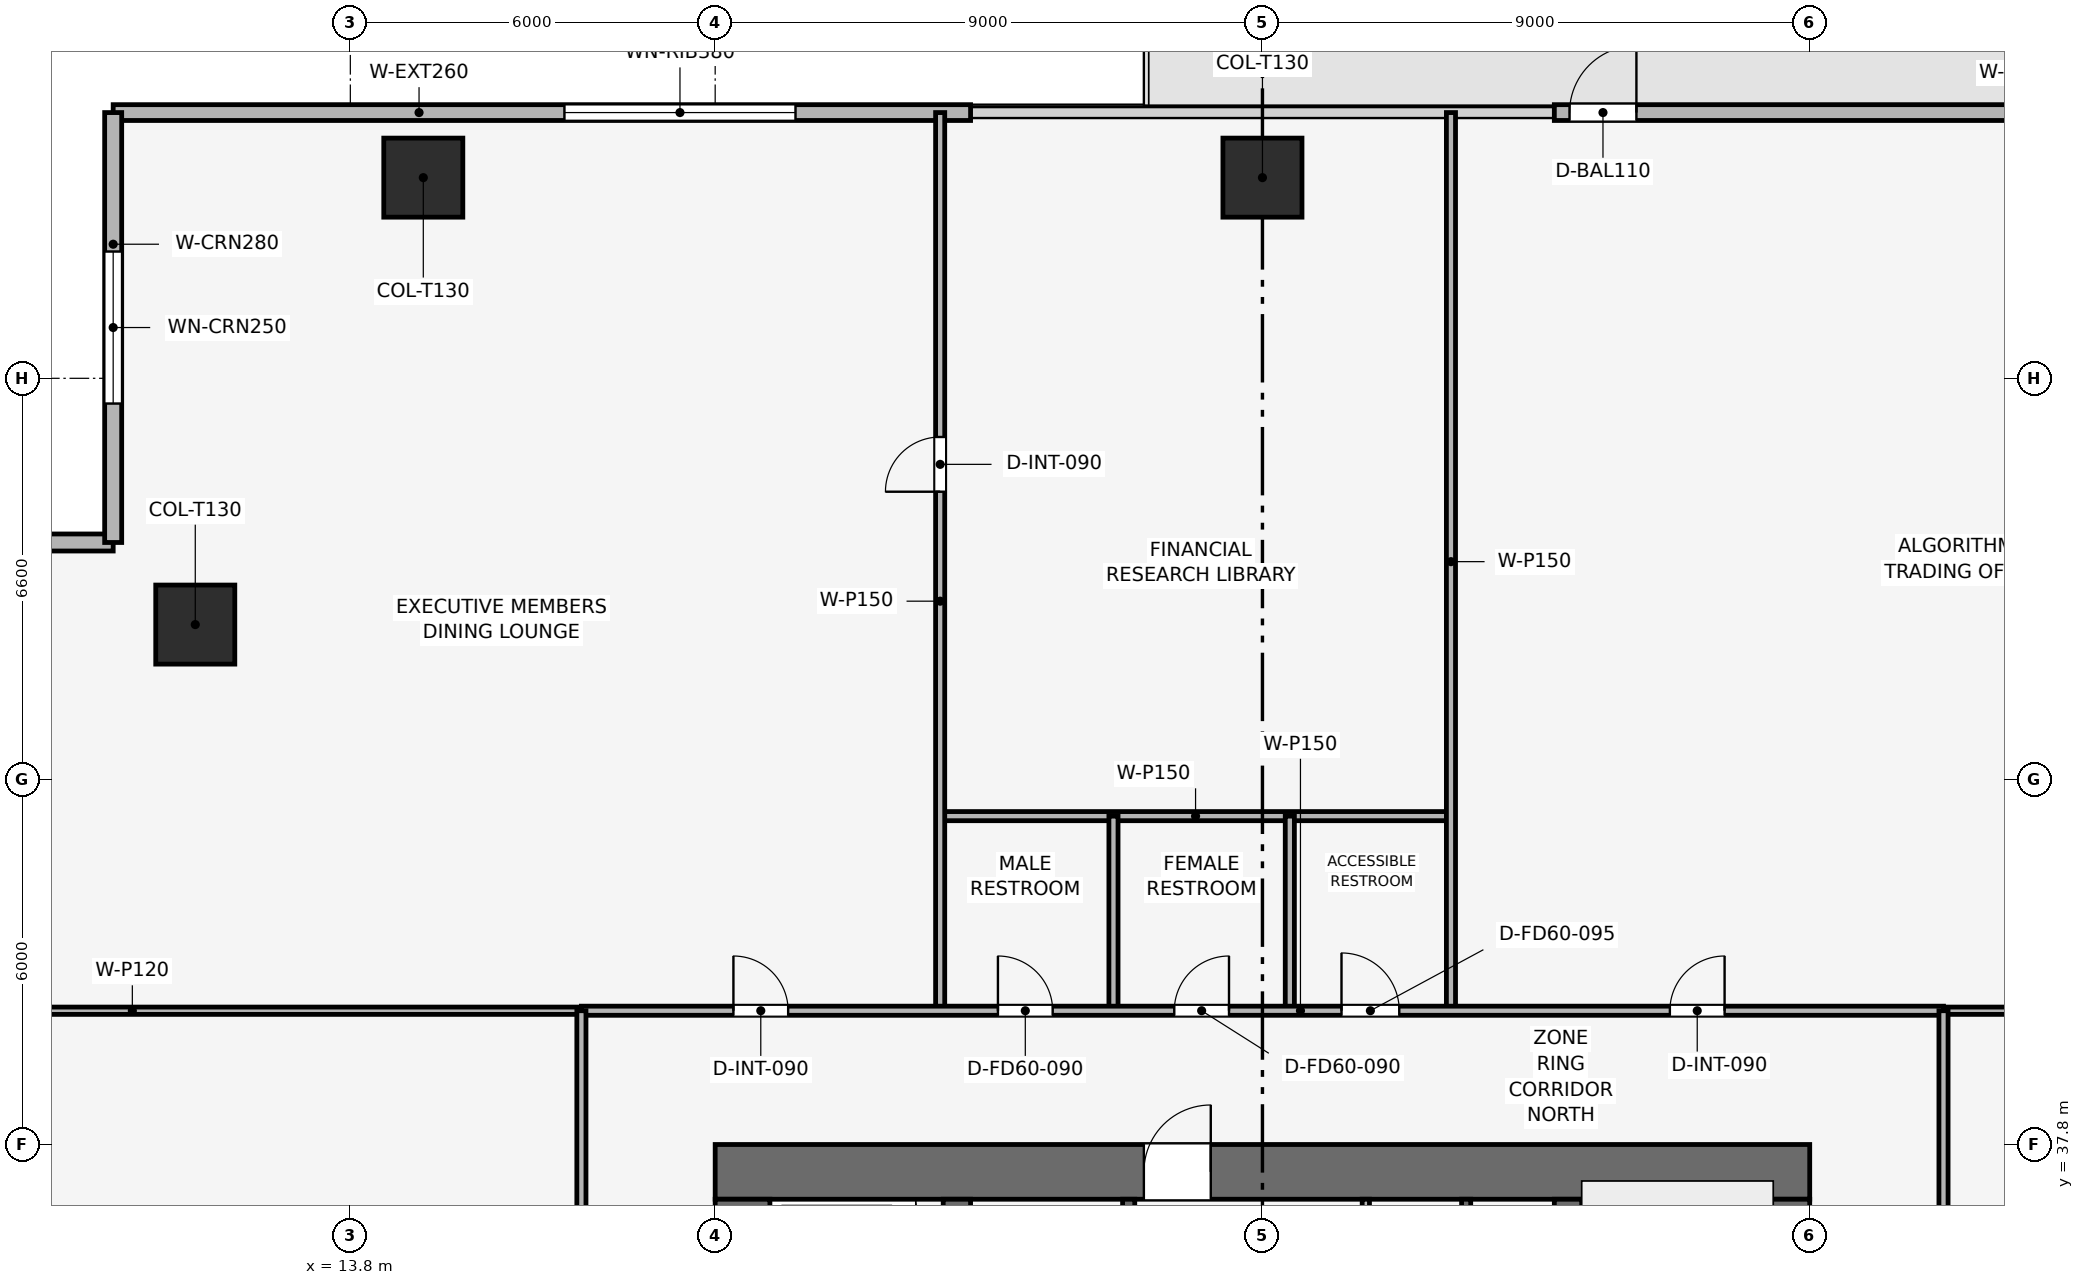
"""IFC4 building model, lengths in metres.
Left out: names, types, materials, properties, quantities, classifications, styles, units other than length and angle.
Written with IfcOpenShell. Run it as: python <this file> out.ifc"""

import sys

from ifc_helpers import new_model, si_unit, direction, frame, frame_2d, origin, origin_2d, place, context, subcontext, project, spatial, rectangle, extrude, element, fill, save


model = new_model("IFC4")
c1 = context("Model", 3, precision=1e-05, world=origin(), true_north=direction((0.0, 1.0)))
c2 = subcontext(c1, "Body", "Model", "MODEL_VIEW")
j1 = project(units=[si_unit("LENGTHUNIT", "METRE"), si_unit("PLANEANGLEUNIT", "RADIAN")], contexts=[c1])
p1 = place(None, origin())
s1 = spatial("IfcSite", under=j1, at=p1, CompositionType="ELEMENT")
p2 = place(p1, origin())
s2 = spatial("IfcBuilding", under=s1, at=p2, CompositionType="ELEMENT")
p3 = place(p2, frame((0.0, 0.0, 125.1)))
s3 = spatial("IfcBuildingStorey", under=s2, at=p3, CompositionType="ELEMENT", Elevation=125.1)
p4 = place(p3, frame((19.8, 37.35, 0.0), z_axis=(0.0, 0.0, 1.0), x_axis=(1.0, 0.0, 0.0)))
e1 = element("IfcWall", 1, at=p4, inside=s3, PredefinedType="SHEAR", context=c2, shape_type="SweptSolid", body=[
    extrude(rectangle(XDim=18.0, YDim=0.9, at=frame_2d((9.0, 0.0))), origin(), (0.0, 0.0, 1.0), 3.9),
])
p5 = place(p4, frame((7.05, 0.0, 0.0)))
e2 = element("IfcOpeningElement", 2, at=p5, cuts=e1, PredefinedType="OPENING", context=c2, shape_type="SweptSolid", body=[
    extrude(rectangle(XDim=1.1, YDim=2.15, at=frame_2d((0.55, 1.075))), frame((0.0, 0.46, 0.0), z_axis=(0.0, -1.0, 0.0), x_axis=(1.0, 0.0, 0.0)), (0.0, 0.0, 1.0), 0.92),
])
p6 = place(p3, frame((20.25, 20.7, 0.0), z_axis=(0.0, 0.0, 1.0), x_axis=(0.0, 1.0, 0.0)))
e3 = element("IfcWall", 3, at=p6, inside=s3, PredefinedType="SHEAR", context=c2, shape_type="SweptSolid", body=[
    extrude(rectangle(XDim=16.2, YDim=0.9, at=frame_2d((8.1, 0.0))), origin(), (0.0, 0.0, 1.0), 3.9),
])
p7 = place(p6, frame((10.1, 0.0, 0.0)))
e4 = element("IfcOpeningElement", 4, at=p7, cuts=e3, PredefinedType="OPENING", context=c2, shape_type="SweptSolid", body=[
    extrude(rectangle(XDim=1.1, YDim=2.15, at=frame_2d((0.55, 1.075))), frame((0.0, 0.46, 0.0), z_axis=(0.0, -1.0, 0.0), x_axis=(1.0, 0.0, 0.0)), (0.0, 0.0, 1.0), 0.92),
])
p8 = place(p3, frame((37.35, 20.7, 0.0), z_axis=(0.0, 0.0, 1.0), x_axis=(0.0, 1.0, 0.0)))
e5 = element("IfcWall", 5, at=p8, inside=s3, PredefinedType="SHEAR", context=c2, shape_type="SweptSolid", body=[
    extrude(rectangle(XDim=16.2, YDim=0.9, at=frame_2d((8.1, 0.0))), origin(), (0.0, 0.0, 1.0), 3.9),
])
p9 = place(p8, frame((4.6, 0.0, 0.0)))
e6 = element("IfcOpeningElement", 6, at=p9, cuts=e5, PredefinedType="OPENING", context=c2, shape_type="SweptSolid", body=[
    extrude(rectangle(XDim=1.1, YDim=2.15, at=frame_2d((0.55, 1.075))), frame((0.0, 0.46, 0.0), z_axis=(0.0, -1.0, 0.0), x_axis=(1.0, 0.0, 0.0)), (0.0, 0.0, 1.0), 0.92),
])
for number, where, z_axis, x_axis in (
    (7, (23.775, 20.7, 0.0), (0.0, 0.0, 1.0), (0.0, 1.0, 0.0)),
    (8, (33.825, 20.7, 0.0), (0.0, 0.0, 1.0), (0.0, 1.0, 0.0)),
):
    element("IfcWall", number, at=place(p3, frame(where, z_axis=z_axis, x_axis=x_axis)), inside=s3, PredefinedType="SHEAR", context=c2, shape_type="SweptSolid", body=[
        extrude(rectangle(XDim=16.2, YDim=0.45, at=frame_2d((8.1, 0.0))), origin(), (0.0, 0.0, 1.0), 3.9),
    ])
for number, where, z_axis, x_axis in (
    (9, (28.8, 53.7, 0.003), (0.0, 0.0, 1.0), (1.0, 0.0, 0.0)),
    (10, (15.0, 53.7, 0.003), (0.0, 0.0, 1.0), (1.0, 0.0, 0.0)),
    (11, (11.25, 46.35, 0.003), (0.0, 0.0, 1.0), (1.0, 0.0, 0.0)),
):
    element("IfcColumn", number, at=place(p3, frame(where, z_axis=z_axis, x_axis=x_axis)), inside=s3, PredefinedType="COLUMN", context=c2, shape_type="SweptSolid", body=[
        extrude(rectangle(XDim=1.3, YDim=1.3, at=origin_2d()), origin(), (0.0, 0.0, 1.0), 3.644),
    ])
p10 = place(p3, frame((9.9, 54.77, 0.0), z_axis=(0.0, 0.0, 1.0), x_axis=(1.0, 0.0, 0.0)))
e12 = element("IfcWall", 12, at=p10, inside=s3, PredefinedType="SOLIDWALL", context=c2, shape_type="SweptSolid", body=[
    extrude(rectangle(XDim=14.1, YDim=0.26, at=frame_2d((7.05, 0.0))), origin(), (0.0, 0.0, 1.0), 3.65),
])
p11 = place(p10, frame((7.421, 0.0, 0.9)))
e13 = element("IfcOpeningElement", 13, at=p11, cuts=e12, PredefinedType="OPENING", context=c2, shape_type="SweptSolid", body=[
    extrude(rectangle(XDim=3.8, YDim=1.9, at=frame_2d((1.9, 0.95))), frame((0.0, 0.14, 0.0), z_axis=(0.0, -1.0, 0.0), x_axis=(1.0, 0.0, 0.0)), (0.0, 0.0, 1.0), 0.28),
])
p12 = place(p3, frame((33.6, 54.77, 0.0), z_axis=(0.0, 0.0, 1.0), x_axis=(1.0, 0.0, 0.0)))
e14 = element("IfcWall", 14, at=p12, inside=s3, PredefinedType="SOLIDWALL", context=c2, shape_type="SweptSolid", body=[
    extrude(rectangle(XDim=14.1, YDim=0.26, at=frame_2d((7.05, 0.0))), origin(), (0.0, 0.0, 1.0), 3.65),
])
p13 = place(p12, frame((0.25, 0.0, 0.0)))
e15 = element("IfcOpeningElement", 15, at=p13, cuts=e14, PredefinedType="OPENING", context=c2, shape_type="SweptSolid", body=[
    extrude(rectangle(XDim=1.1, YDim=2.2, at=frame_2d((0.55, 1.1))), frame((0.0, 0.14, 0.0), z_axis=(0.0, -1.0, 0.0), x_axis=(1.0, 0.0, 0.0)), (0.0, 0.0, 1.0), 0.28),
])
p14 = place(p3, frame((2.83, 47.7, 0.0), z_axis=(0.0, 0.0, 1.0), x_axis=(1.0, 0.0, 0.0)))
e16 = element("IfcWall", 16, at=p14, inside=s3, PredefinedType="SOLIDWALL", context=c2, shape_type="SweptSolid", body=[
    extrude(rectangle(XDim=7.07, YDim=0.28, at=frame_2d((3.535, 0.0))), origin(), (0.0, 0.0, 1.0), 3.65),
])
p15 = place(p14, frame((2.285, 0.0, 0.9)))
e17 = element("IfcOpeningElement", 17, at=p15, cuts=e16, PredefinedType="OPENING", context=c2, shape_type="SweptSolid", body=[
    extrude(rectangle(XDim=2.5, YDim=1.9, at=frame_2d((1.25, 0.95))), frame((0.0, 0.15, 0.0), z_axis=(0.0, -1.0, 0.0), x_axis=(1.0, 0.0, 0.0)), (0.0, 0.0, 1.0), 0.3),
])
p16 = place(p3, frame((9.9, 47.7, 0.0), z_axis=(0.0, 0.0, 1.0), x_axis=(0.0, 1.0, 0.0)))
e18 = element("IfcWall", 18, at=p16, inside=s3, PredefinedType="SOLIDWALL", context=c2, shape_type="SweptSolid", body=[
    extrude(rectangle(XDim=7.07, YDim=0.28, at=frame_2d((3.535, 0.0))), origin(), (0.0, 0.0, 1.0), 3.65),
])
p17 = place(p16, frame((2.285, 0.0, 0.9)))
e19 = element("IfcOpeningElement", 19, at=p17, cuts=e18, PredefinedType="OPENING", context=c2, shape_type="SweptSolid", body=[
    extrude(rectangle(XDim=2.5, YDim=1.9, at=frame_2d((1.25, 0.95))), frame((0.0, 0.15, 0.0), z_axis=(0.0, -1.0, 0.0), x_axis=(1.0, 0.0, 0.0)), (0.0, 0.0, 1.0), 0.3),
])
p18 = place(p3, frame((32.15, 34.0, 0.0), z_axis=(0.0, 0.0, 1.0), x_axis=(0.0, 1.0, 0.0)))
e20 = element("IfcWall", 20, at=p18, inside=s3, PredefinedType="SHEAR", context=c2, shape_type="SweptSolid", body=[
    extrude(rectangle(XDim=2.9, YDim=0.15, at=frame_2d((1.45, 0.0))), origin(), (0.0, 0.0, 1.0), 3.65),
])
p19 = place(p3, frame((26.6, 34.0, 0.0), z_axis=(0.0, 0.0, 1.0), x_axis=(0.0, 1.0, 0.0)))
e21 = element("IfcWall", 21, at=p19, inside=s3, PredefinedType="SHEAR", context=c2, shape_type="SweptSolid", body=[
    extrude(rectangle(XDim=2.9, YDim=0.2, at=frame_2d((1.45, 0.0))), origin(), (0.0, 0.0, 1.0), 3.65),
])
p20 = place(p19, frame((0.75, 0.0, 0.0)))
e22 = element("IfcOpeningElement", 22, at=p20, cuts=e21, PredefinedType="OPENING", context=c2, shape_type="SweptSolid", body=[
    extrude(rectangle(XDim=1.1, YDim=2.15, at=frame_2d((0.55, 1.075))), frame((0.0, 0.11, 0.0), z_axis=(0.0, -1.0, 0.0), x_axis=(1.0, 0.0, 0.0)), (0.0, 0.0, 1.0), 0.22),
])
p21 = place(p3, frame((30.5, 33.925, 0.0), z_axis=(0.0, 0.0, 1.0), x_axis=(0.0, 1.0, 0.0)))
e23 = element("IfcWall", 23, at=p21, inside=s3, PredefinedType="PARTITIONING", context=c2, shape_type="SweptSolid", body=[
    extrude(rectangle(XDim=2.975, YDim=0.12, at=frame_2d((1.487, 0.0))), origin(), (0.0, 0.0, 1.0), 3.65),
])
p22 = place(p21, frame((0.85, 0.0, 0.0)))
e24 = element("IfcOpeningElement", 24, at=p22, cuts=e23, PredefinedType="OPENING", context=c2, shape_type="SweptSolid", body=[
    extrude(rectangle(XDim=0.9, YDim=2.1, at=frame_2d((0.45, 1.05))), frame((0.0, 0.07, 0.0), z_axis=(0.0, -1.0, 0.0), x_axis=(1.0, 0.0, 0.0)), (0.0, 0.0, 1.0), 0.14),
])
p23 = place(p3, frame((23.5, 43.2, 0.0), z_axis=(0.0, 0.0, 1.0), x_axis=(1.0, 0.0, 0.0)))
e25 = element("IfcWall", 25, at=p23, inside=s3, PredefinedType="PARTITIONING", context=c2, shape_type="SweptSolid", body=[
    extrude(rectangle(XDim=8.4, YDim=0.15, at=frame_2d((4.2, 0.0))), origin(), (0.0, 0.0, 1.0), 3.185),
])
p24 = place(p3, frame((23.5, 40.0, 0.0), z_axis=(0.0, 0.0, 1.0), x_axis=(0.0, 1.0, 0.0)))
e26 = element("IfcWall", 26, at=p24, inside=s3, PredefinedType="PARTITIONING", context=c2, shape_type="SweptSolid", body=[
    extrude(rectangle(XDim=14.77, YDim=0.15, at=frame_2d((7.385, 0.0))), origin(), (0.0, 0.0, 1.0), 3.035),
])
p25 = place(p24, frame((8.535, 0.0, 0.0)))
e27 = element("IfcOpeningElement", 27, at=p25, cuts=e26, PredefinedType="OPENING", context=c2, shape_type="SweptSolid", body=[
    extrude(rectangle(XDim=0.9, YDim=2.1, at=frame_2d((0.45, 1.05))), frame((0.0, 0.085, 0.0), z_axis=(0.0, -1.0, 0.0), x_axis=(1.0, 0.0, 0.0)), (0.0, 0.0, 1.0), 0.17),
])
p26 = place(p3, frame((31.9, 40.0, 0.0), z_axis=(0.0, 0.0, 1.0), x_axis=(0.0, 1.0, 0.0)))
e28 = element("IfcWall", 28, at=p26, inside=s3, PredefinedType="PARTITIONING", context=c2, shape_type="SweptSolid", body=[
    extrude(rectangle(XDim=14.77, YDim=0.15, at=frame_2d((7.385, 0.0))), origin(), (0.0, 0.0, 1.0), 3.035),
])
for number, where, z_axis, x_axis in (
    (29, (26.35, 40.0, 0.0), (0.0, 0.0, 1.0), (0.0, 1.0, 0.0)),
    (30, (29.25, 40.0, 0.0), (0.0, 0.0, 1.0), (0.0, 1.0, 0.0)),
):
    element("IfcWall", number, at=place(p3, frame(where, z_axis=z_axis, x_axis=x_axis)), inside=s3, PredefinedType="PARTITIONING", context=c2, shape_type="SweptSolid", body=[
        extrude(rectangle(XDim=3.2, YDim=0.15, at=frame_2d((1.6, 0.0))), origin(), (0.0, 0.0, 1.0), 3.65),
    ])
for number, where, z_axis, x_axis in (
    (31, (2.83, 40.0, 0.0), (0.0, 0.0, 1.0), (1.0, 0.0, 0.0)),
    (32, (40.0, 40.0, 0.0), (0.0, 0.0, 1.0), (1.0, 0.0, 0.0)),
):
    element("IfcWall", number, at=place(p3, frame(where, z_axis=z_axis, x_axis=x_axis)), inside=s3, PredefinedType="PARTITIONING", context=c2, shape_type="SweptSolid", body=[
        extrude(rectangle(XDim=14.77, YDim=0.12, at=frame_2d((7.385, 0.0))), origin(), (0.0, 0.0, 1.0), 3.035),
    ])
p27 = place(p3, frame((17.6, 40.0, 0.0), z_axis=(0.0, 0.0, 1.0), x_axis=(1.0, 0.0, 0.0)))
e33 = element("IfcWall", 33, at=p27, inside=s3, PredefinedType="PARTITIONING", context=c2, shape_type="SweptSolid", body=[
    extrude(rectangle(XDim=22.4, YDim=0.15, at=frame_2d((11.2, 0.0))), origin(), (0.0, 0.0, 1.0), 3.185),
])
p28 = place(p27, frame((2.5, 0.0, 0.0)))
e34 = element("IfcOpeningElement", 34, at=p28, cuts=e33, PredefinedType="OPENING", context=c2, shape_type="SweptSolid", body=[
    extrude(rectangle(XDim=0.9, YDim=2.1, at=frame_2d((0.45, 1.05))), frame((0.0, 0.085, 0.0), z_axis=(0.0, -1.0, 0.0), x_axis=(1.0, 0.0, 0.0)), (0.0, 0.0, 1.0), 0.17),
])
p29 = place(p27, frame((6.85, 0.0, 0.0)))
e35 = element("IfcOpeningElement", 35, at=p29, cuts=e33, PredefinedType="OPENING", context=c2, shape_type="SweptSolid", body=[
    extrude(rectangle(XDim=0.9, YDim=2.1, at=frame_2d((0.45, 1.05))), frame((0.0, 0.085, 0.0), z_axis=(0.0, -1.0, 0.0), x_axis=(1.0, 0.0, 0.0)), (0.0, 0.0, 1.0), 0.17),
])
p30 = place(p27, frame((9.75, 0.0, 0.0)))
e36 = element("IfcOpeningElement", 36, at=p30, cuts=e33, PredefinedType="OPENING", context=c2, shape_type="SweptSolid", body=[
    extrude(rectangle(XDim=0.9, YDim=2.1, at=frame_2d((0.45, 1.05))), frame((0.0, 0.085, 0.0), z_axis=(0.0, -1.0, 0.0), x_axis=(1.0, 0.0, 0.0)), (0.0, 0.0, 1.0), 0.17),
])
p31 = place(p27, frame((12.5, 0.0, 0.0)))
e37 = element("IfcOpeningElement", 37, at=p31, cuts=e33, PredefinedType="OPENING", context=c2, shape_type="SweptSolid", body=[
    extrude(rectangle(XDim=0.95, YDim=2.1, at=frame_2d((0.475, 1.05))), frame((0.0, 0.085, 0.0), z_axis=(0.0, -1.0, 0.0), x_axis=(1.0, 0.0, 0.0)), (0.0, 0.0, 1.0), 0.17),
])
p32 = place(p27, frame((17.9, 0.0, 0.0)))
e38 = element("IfcOpeningElement", 38, at=p32, cuts=e33, PredefinedType="OPENING", context=c2, shape_type="SweptSolid", body=[
    extrude(rectangle(XDim=0.9, YDim=2.1, at=frame_2d((0.45, 1.05))), frame((0.0, 0.085, 0.0), z_axis=(0.0, -1.0, 0.0), x_axis=(1.0, 0.0, 0.0)), (0.0, 0.0, 1.0), 0.17),
])
p33 = place(p3, frame((17.6, 17.6, 0.0), z_axis=(0.0, 0.0, 1.0), x_axis=(0.0, 1.0, 0.0)))
e39 = element("IfcWall", 39, at=p33, inside=s3, PredefinedType="PARTITIONING", context=c2, shape_type="SweptSolid", body=[
    extrude(rectangle(XDim=22.4, YDim=0.15, at=frame_2d((11.2, 0.0))), origin(), (0.0, 0.0, 1.0), 3.185),
])
p34 = place(p33, frame((4.616, 0.0, 0.0)))
e40 = element("IfcOpeningElement", 40, at=p34, cuts=e39, PredefinedType="OPENING", context=c2, shape_type="SweptSolid", body=[
    extrude(rectangle(XDim=0.9, YDim=2.1, at=frame_2d((0.45, 1.05))), frame((0.0, 0.085, 0.0), z_axis=(0.0, -1.0, 0.0), x_axis=(1.0, 0.0, 0.0)), (0.0, 0.0, 1.0), 0.17),
])
p35 = place(p33, frame((15.816, 0.0, 0.0)))
e41 = element("IfcOpeningElement", 41, at=p35, cuts=e39, PredefinedType="OPENING", context=c2, shape_type="SweptSolid", body=[
    extrude(rectangle(XDim=0.9, YDim=2.1, at=frame_2d((0.45, 1.05))), frame((0.0, 0.085, 0.0), z_axis=(0.0, -1.0, 0.0), x_axis=(1.0, 0.0, 0.0)), (0.0, 0.0, 1.0), 0.17),
])
p36 = place(p3, frame((40.0, 17.6, 0.0), z_axis=(0.0, 0.0, 1.0), x_axis=(0.0, 1.0, 0.0)))
e42 = element("IfcWall", 42, at=p36, inside=s3, PredefinedType="PARTITIONING", context=c2, shape_type="SweptSolid", body=[
    extrude(rectangle(XDim=22.4, YDim=0.15, at=frame_2d((11.2, 0.0))), origin(), (0.0, 0.0, 1.0), 3.185),
])
p37 = place(p36, frame((10.75, 0.0, 0.0)))
e43 = element("IfcOpeningElement", 43, at=p37, cuts=e42, PredefinedType="OPENING", context=c2, shape_type="SweptSolid", body=[
    extrude(rectangle(XDim=0.9, YDim=2.1, at=frame_2d((0.45, 1.05))), frame((0.0, 0.085, 0.0), z_axis=(0.0, -1.0, 0.0), x_axis=(1.0, 0.0, 0.0)), (0.0, 0.0, 1.0), 0.17),
])
p38 = place(p13, origin())
e44 = element("IfcDoor", 44, at=p38, inside=s3, OperationType="SINGLE_SWING_RIGHT", PredefinedType="DOOR", context=c2, shape_type="SweptSolid", body=[
    extrude(rectangle(XDim=1.1, YDim=2.2, at=frame_2d((0.55, 1.1))), frame((0.0, 0.025, 0.0), z_axis=(0.0, -1.0, 0.0), x_axis=(1.0, 0.0, 0.0)), (0.0, 0.0, 1.0), 0.05),
])
fill(e15, e44)
p39 = place(p11, origin())
e45 = element("IfcWindow", 45, at=p39, inside=s3, PartitioningType="SINGLE_PANEL", PredefinedType="WINDOW", context=c2, shape_type="SweptSolid", body=[
    extrude(rectangle(XDim=3.8, YDim=1.9, at=frame_2d((1.9, 0.95))), frame((0.0, 0.03, 0.0), z_axis=(0.0, -1.0, 0.0), x_axis=(1.0, 0.0, 0.0)), (0.0, 0.0, 1.0), 0.06),
])
fill(e13, e45)
p40 = place(p17, origin())
e46 = element("IfcWindow", 46, at=p40, inside=s3, PartitioningType="SINGLE_PANEL", PredefinedType="WINDOW", context=c2, shape_type="SweptSolid", body=[
    extrude(rectangle(XDim=2.5, YDim=1.9, at=frame_2d((1.25, 0.95))), frame((0.0, 0.03, 0.0), z_axis=(0.0, -1.0, 0.0), x_axis=(1.0, 0.0, 0.0)), (0.0, 0.0, 1.0), 0.06),
])
fill(e19, e46)
p41 = place(p25, origin())
e47 = element("IfcDoor", 47, at=p41, inside=s3, OperationType="SINGLE_SWING_LEFT", PredefinedType="DOOR", context=c2, shape_type="SweptSolid", body=[
    extrude(rectangle(XDim=0.9, YDim=2.1, at=frame_2d((0.45, 1.05))), frame((0.0, 0.025, 0.0), z_axis=(0.0, -1.0, 0.0), x_axis=(1.0, 0.0, 0.0)), (0.0, 0.0, 1.0), 0.05),
])
fill(e27, e47)
p42 = place(p28, origin())
e48 = element("IfcDoor", 48, at=p42, inside=s3, OperationType="SINGLE_SWING_LEFT", PredefinedType="DOOR", context=c2, shape_type="SweptSolid", body=[
    extrude(rectangle(XDim=0.9, YDim=2.1, at=frame_2d((0.45, 1.05))), frame((0.0, 0.025, 0.0), z_axis=(0.0, -1.0, 0.0), x_axis=(1.0, 0.0, 0.0)), (0.0, 0.0, 1.0), 0.05),
])
fill(e34, e48)
p43 = place(p29, origin())
e49 = element("IfcDoor", 49, at=p43, inside=s3, OperationType="SINGLE_SWING_LEFT", PredefinedType="DOOR", context=c2, shape_type="SweptSolid", body=[
    extrude(rectangle(XDim=0.9, YDim=2.1, at=frame_2d((0.45, 1.05))), frame((0.0, 0.025, 0.0), z_axis=(0.0, -1.0, 0.0), x_axis=(1.0, 0.0, 0.0)), (0.0, 0.0, 1.0), 0.05),
])
fill(e35, e49)
p44 = place(p30, origin())
e50 = element("IfcDoor", 50, at=p44, inside=s3, OperationType="SINGLE_SWING_RIGHT", PredefinedType="DOOR", context=c2, shape_type="SweptSolid", body=[
    extrude(rectangle(XDim=0.9, YDim=2.1, at=frame_2d((0.45, 1.05))), frame((0.0, 0.025, 0.0), z_axis=(0.0, -1.0, 0.0), x_axis=(1.0, 0.0, 0.0)), (0.0, 0.0, 1.0), 0.05),
])
fill(e36, e50)
p45 = place(p31, origin())
e51 = element("IfcDoor", 51, at=p45, inside=s3, OperationType="SINGLE_SWING_LEFT", PredefinedType="DOOR", context=c2, shape_type="SweptSolid", body=[
    extrude(rectangle(XDim=0.95, YDim=2.1, at=frame_2d((0.475, 1.05))), frame((0.0, 0.025, 0.0), z_axis=(0.0, -1.0, 0.0), x_axis=(1.0, 0.0, 0.0)), (0.0, 0.0, 1.0), 0.05),
])
fill(e37, e51)
p46 = place(p32, origin())
e52 = element("IfcDoor", 52, at=p46, inside=s3, OperationType="SINGLE_SWING_RIGHT", PredefinedType="DOOR", context=c2, shape_type="SweptSolid", body=[
    extrude(rectangle(XDim=0.9, YDim=2.1, at=frame_2d((0.45, 1.05))), frame((0.0, 0.025, 0.0), z_axis=(0.0, -1.0, 0.0), x_axis=(1.0, 0.0, 0.0)), (0.0, 0.0, 1.0), 0.05),
])
fill(e38, e52)
p47 = place(p5, origin())
e53 = element("IfcDoor", 53, at=p47, inside=s3, OperationType="SINGLE_SWING_RIGHT", PredefinedType="DOOR", context=c2, shape_type="SweptSolid", body=[
    extrude(rectangle(XDim=1.1, YDim=2.15, at=frame_2d((0.55, 1.075))), frame((0.0, 0.025, 0.0), z_axis=(0.0, -1.0, 0.0), x_axis=(1.0, 0.0, 0.0)), (0.0, 0.0, 1.0), 0.05),
])
fill(e2, e53)
save(model, sys.argv[1])
